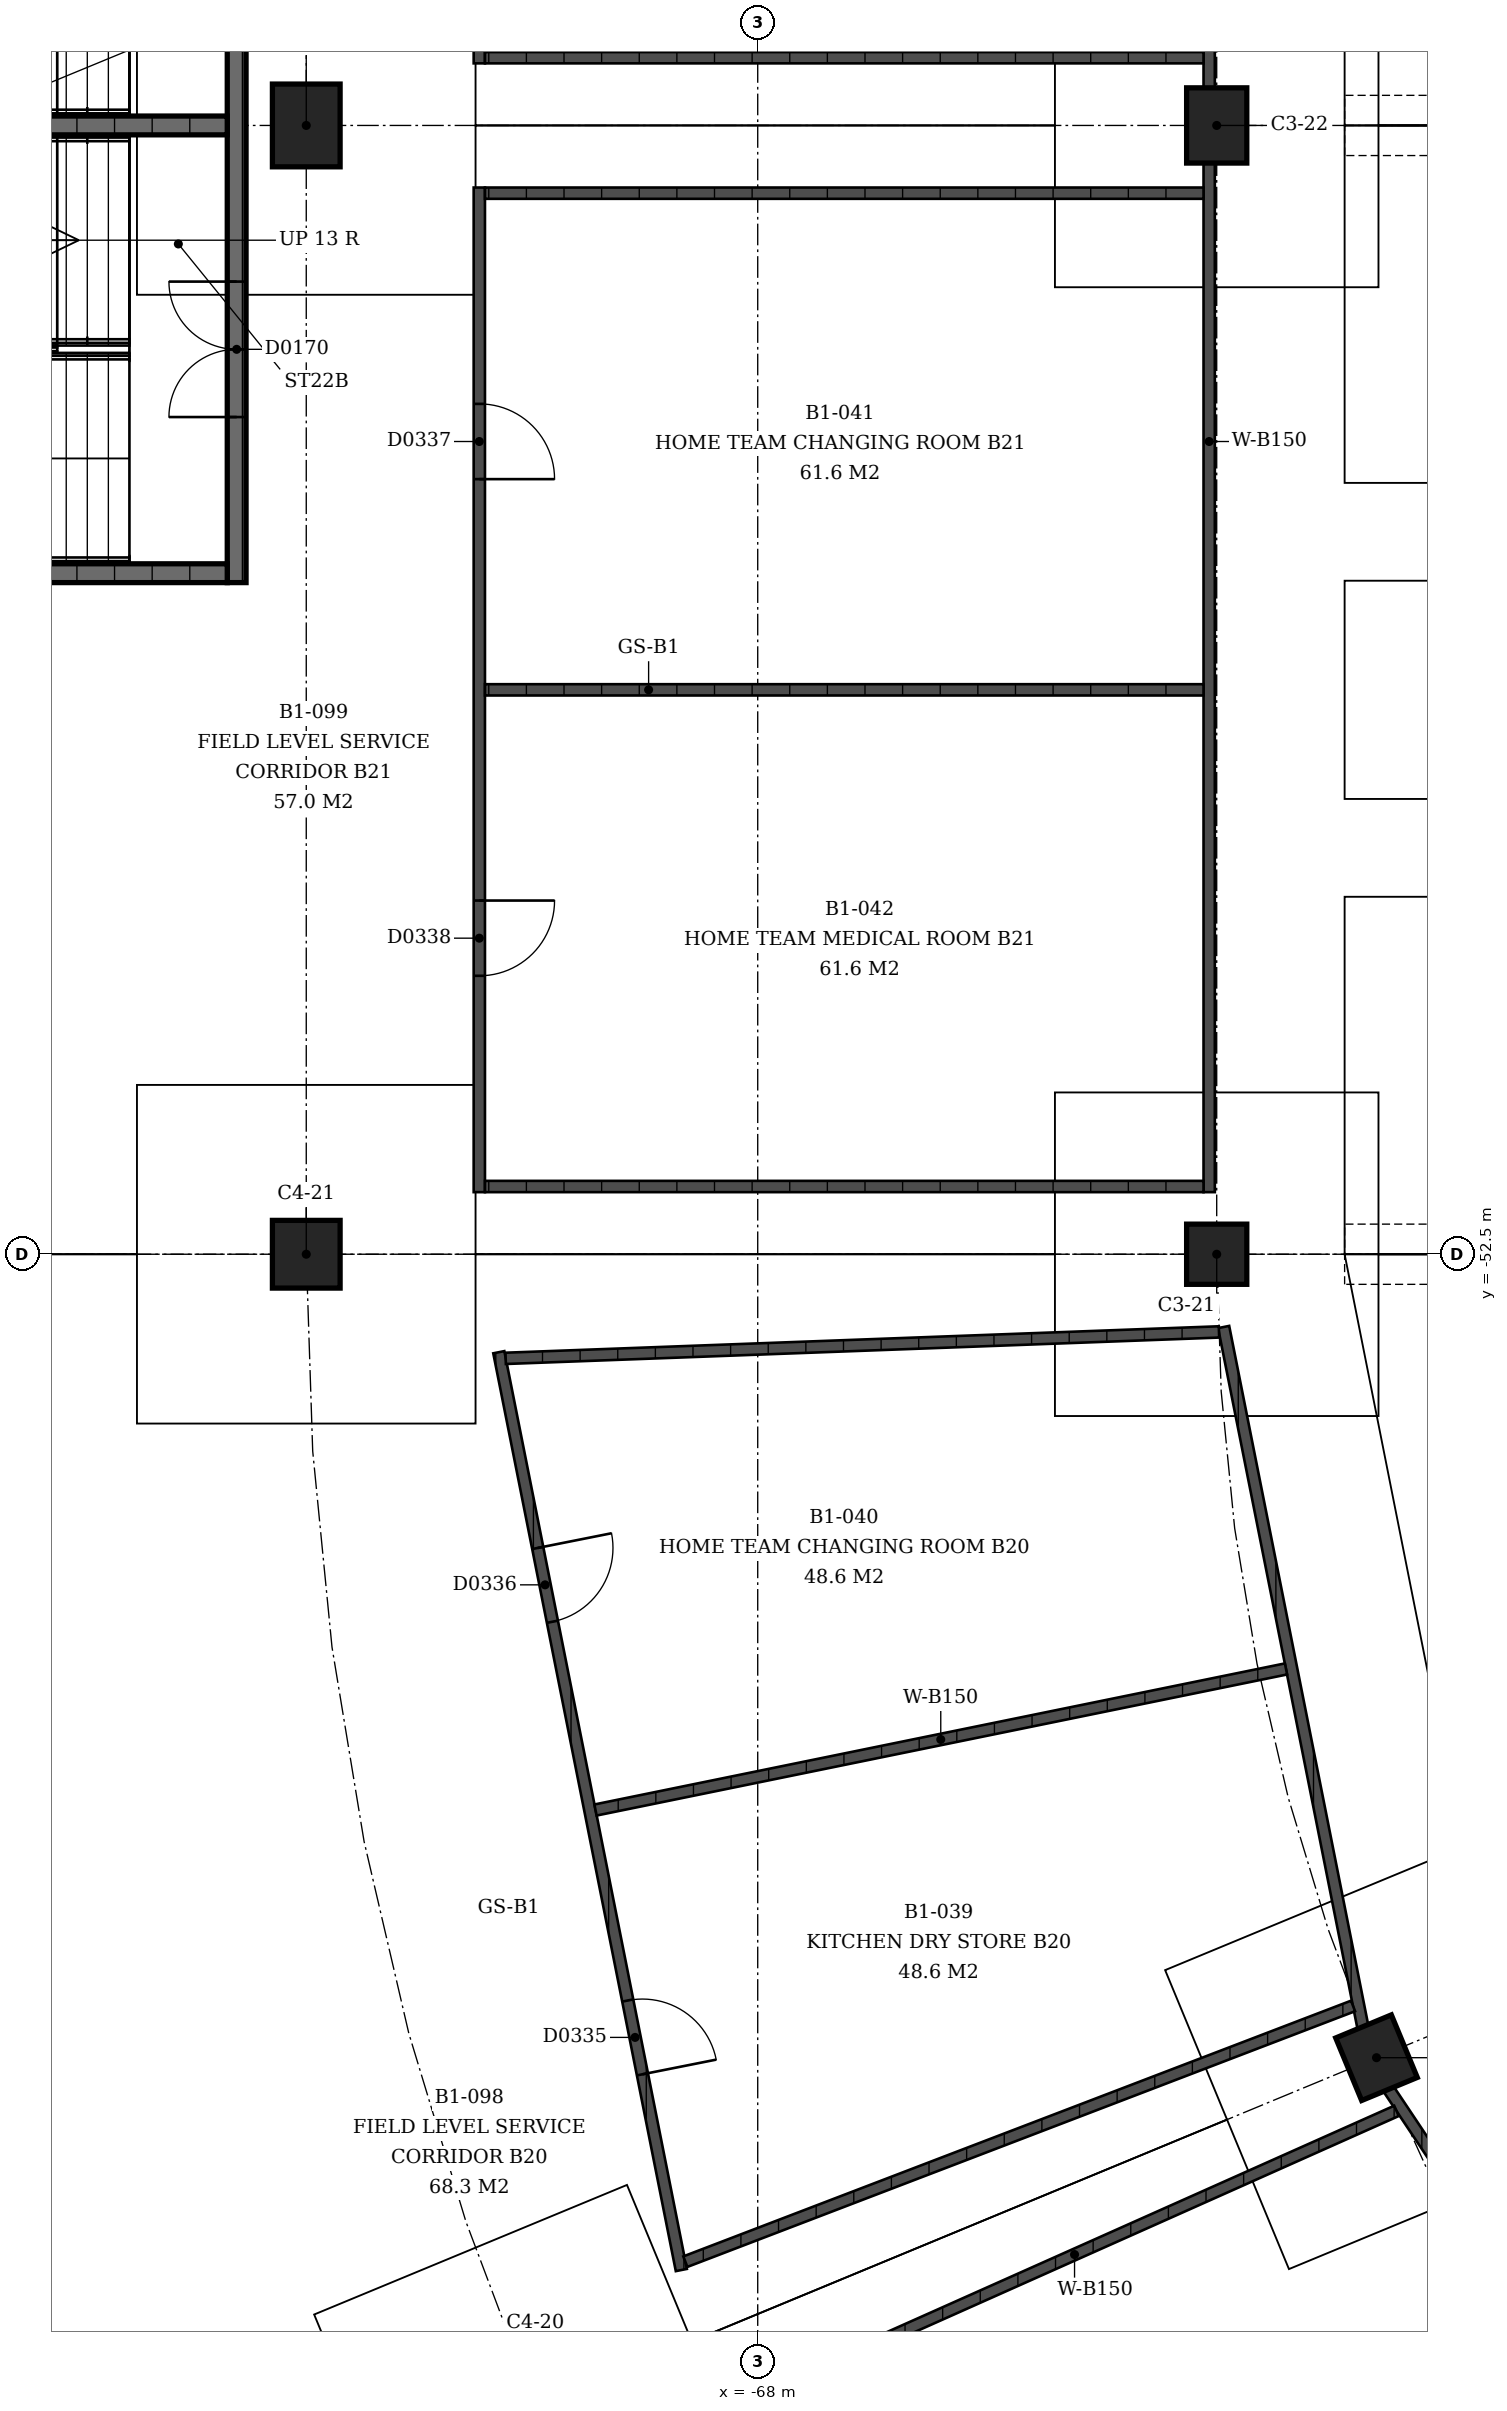
"""IFC4 building model, lengths in metres.
Left out: names, types, materials, properties, quantities, classifications, styles, units other than length and angle.
Written with IfcOpenShell. Run it as: python <this file> out.ifc"""

import sys

from ifc_helpers import new_model, si_unit, direction, frame, frame_2d, origin, origin_2d, place, context, subcontext, project, spatial, rectangle, extrude, element, fill, save


model = new_model("IFC4")
c1 = context("Model", 3, precision=1e-05, world=origin(), true_north=direction((0.0, 1.0)))
c2 = subcontext(c1, "Body", "Model", "MODEL_VIEW")
j1 = project(units=[si_unit("LENGTHUNIT", "METRE"), si_unit("PLANEANGLEUNIT", "RADIAN")], contexts=[c1])
p1 = place(None, origin())
s1 = spatial("IfcSite", under=j1, at=p1, CompositionType="ELEMENT")
p2 = place(p1, origin())
s2 = spatial("IfcBuilding", under=s1, at=p2, CompositionType="ELEMENT")
p3 = place(p2, frame((0.0, 0.0, -4.5)))
s3 = spatial("IfcBuildingStorey", under=s2, at=p3, CompositionType="ELEMENT", Elevation=-4.5)
p4 = place(p3, frame((-59.776, -63.177, 0.0), z_axis=(0.0, 0.0, 1.0), x_axis=(0.382683432365, -0.923879532511, 0.0)))
e1 = element("IfcColumn", 1, at=p4, inside=s3, PredefinedType="COLUMN", context=c2, shape_type="SweptSolid", body=[
    extrude(rectangle(XDim=0.9, YDim=0.8, at=origin_2d()), origin(), (0.0, 0.0, 1.0), 4.5),
])
p5 = place(p3, frame((-61.9, -52.5, 0.0), z_axis=(0.0, 0.0, 1.0), x_axis=(0.0, -1.0, 0.0)))
e2 = element("IfcColumn", 2, at=p5, inside=s3, PredefinedType="COLUMN", context=c2, shape_type="SweptSolid", body=[
    extrude(rectangle(XDim=0.8, YDim=0.8, at=origin_2d()), origin(), (0.0, 0.0, 1.0), 4.5),
])
p6 = place(p3, frame((-74.0, -52.5, 0.0), z_axis=(0.0, 0.0, 1.0), x_axis=(0.0, -1.0, 0.0)))
e3 = element("IfcColumn", 3, at=p6, inside=s3, PredefinedType="COLUMN", context=c2, shape_type="SweptSolid", body=[
    extrude(rectangle(XDim=0.9, YDim=0.9, at=origin_2d()), origin(), (0.0, 0.0, 1.0), 4.5),
])
p7 = place(p3, frame((-61.9, -37.5, 0.0), z_axis=(0.0, 0.0, 1.0), x_axis=(0.0, -1.0, 0.0)))
e4 = element("IfcColumn", 4, at=p7, inside=s3, PredefinedType="COLUMN", context=c2, shape_type="SweptSolid", body=[
    extrude(rectangle(XDim=1.0, YDim=0.8, at=origin_2d()), origin(), (0.0, 0.0, 1.0), 4.5),
])
p8 = place(p3, frame((-74.0, -37.5, 0.0), z_axis=(0.0, 0.0, 1.0), x_axis=(0.0, -1.0, 0.0)))
e5 = element("IfcColumn", 5, at=p8, inside=s3, PredefinedType="COLUMN", context=c2, shape_type="SweptSolid", body=[
    extrude(rectangle(XDim=1.1, YDim=0.9, at=origin_2d()), origin(), (0.0, 0.0, 1.0), 4.5),
])
p9 = place(p3, frame((-74.925, -31.425, 0.0), z_axis=(0.0, 0.0, 1.0), x_axis=(0.0, -1.0, 0.0)))
e6 = element("IfcWall", 6, at=p9, inside=s3, PredefinedType="SHEAR", context=c2, shape_type="SweptSolid", body=[
    extrude(rectangle(XDim=12.15, YDim=0.25, at=frame_2d((6.075, 0.0))), origin(), (0.0, 0.0, 1.0), 4.09),
])
p10 = place(p9, frame((2.2, 0.0, 0.0)))
e7 = element("IfcOpeningElement", 7, at=p10, cuts=e6, PredefinedType="OPENING", context=c2, shape_type="SweptSolid", body=[
    extrude(rectangle(XDim=1.8, YDim=2.1, at=frame_2d((0.9, 1.05))), frame((0.0, 0.125, 0.0), z_axis=(0.0, -1.0, 0.0), x_axis=(1.0, 0.0, 0.0)), (0.0, 0.0, 1.0), 0.25),
])
p11 = place(p9, frame((8.15, 0.0, 0.0)))
e8 = element("IfcOpeningElement", 8, at=p11, cuts=e6, PredefinedType="OPENING", context=c2, shape_type="SweptSolid", body=[
    extrude(rectangle(XDim=1.8, YDim=2.1, at=frame_2d((0.9, 1.05))), frame((0.0, 0.125, 0.0), z_axis=(0.0, -1.0, 0.0), x_axis=(1.0, 0.0, 0.0)), (0.0, 0.0, 1.0), 0.25),
])
for number, where, z_axis, x_axis in (
    (9, (-75.05, -43.45, 0.0), (0.0, 0.0, 1.0), (-1.0, 0.0, 0.0)),
    (10, (-75.05, -37.5, 0.0), (0.0, 0.0, 1.0), (-1.0, 0.0, 0.0)),
):
    element("IfcWall", number, at=place(p3, frame(where, z_axis=z_axis, x_axis=x_axis)), inside=s3, PredefinedType="SHEAR", context=c2, shape_type="SweptSolid", body=[
        extrude(rectangle(XDim=7.46, YDim=0.25, at=frame_2d((3.73, 0.0))), origin(), (0.0, 0.0, 1.0), 4.09),
    ])
p12 = place(p3, frame((-59.614, -63.597, 0.0), z_axis=(0.0, 0.0, 1.0), x_axis=(0.555579425305, -0.831463470141, 0.0)))
e11 = element("IfcWall", 11, at=p12, inside=s3, PredefinedType="SOLIDWALL", context=c2, shape_type="SweptSolid", body=[
    extrude(rectangle(XDim=9.48, YDim=0.15, at=frame_2d((4.74, 0.0))), origin(), (0.0, 0.0, 1.0), 3.0),
])
p13 = place(p3, frame((-59.51, -63.883, 0.0), z_axis=(0.0, 0.0, 1.0), x_axis=(-0.913203450279, -0.407503936666, 0.0)))
e12 = element("IfcWall", 12, at=p13, inside=s3, PredefinedType="SOLIDWALL", context=c2, shape_type="SweptSolid", body=[
    extrude(rectangle(XDim=9.502, YDim=0.15, at=frame_2d((4.751, 0.0))), origin(), (0.0, 0.0, 1.0), 3.0),
])
p14 = place(p3, frame((-59.958, -62.765, 0.0), z_axis=(0.0, 0.0, 1.0), x_axis=(-0.195076015612, 0.980788126016, 0.0)))
e13 = element("IfcWall", 13, at=p14, inside=s3, PredefinedType="SOLIDWALL", context=c2, shape_type="SweptSolid", body=[
    extrude(rectangle(XDim=9.48, YDim=0.15, at=frame_2d((4.74, 0.0))), origin(), (0.0, 0.0, 1.0), 3.0),
])
p15 = place(p3, frame((-69.015, -65.999, 0.0), z_axis=(0.0, 0.0, 1.0), x_axis=(-0.195089091876, 0.980785525093, 0.0)))
e14 = element("IfcWall", 14, at=p15, inside=s3, PredefinedType="SOLIDWALL", context=c2, shape_type="SweptSolid", body=[
    extrude(rectangle(XDim=12.436, YDim=0.15, at=frame_2d((6.218, 0.0))), origin(), (0.0, 0.0, 1.0), 3.0),
])
p16 = place(p15, frame((2.652, 0.0, 0.0)))
e15 = element("IfcOpeningElement", 15, at=p16, cuts=e14, PredefinedType="OPENING", context=c2, shape_type="SweptSolid", body=[
    extrude(rectangle(XDim=1.0, YDim=2.1, at=frame_2d((0.5, 1.05))), frame((0.0, 0.075, 0.0), z_axis=(0.0, -1.0, 0.0), x_axis=(1.0, 0.0, 0.0)), (0.0, 0.0, 1.0), 0.15),
])
p17 = place(p15, frame((8.784, 0.0, 0.0)))
e16 = element("IfcOpeningElement", 16, at=p17, cuts=e14, PredefinedType="OPENING", context=c2, shape_type="SweptSolid", body=[
    extrude(rectangle(XDim=1.0, YDim=2.1, at=frame_2d((0.5, 1.05))), frame((0.0, 0.075, 0.0), z_axis=(0.0, -1.0, 0.0), x_axis=(1.0, 0.0, 0.0)), (0.0, 0.0, 1.0), 0.15),
])
p18 = place(p3, frame((-60.088, -62.49, 0.0), z_axis=(0.0, 0.0, 1.0), x_axis=(-0.93388157938, -0.357582432029, 0.0)))
e17 = element("IfcWall", 17, at=p18, inside=s3, PredefinedType="SOLIDWALL", context=c2, shape_type="SweptSolid", body=[
    extrude(rectangle(XDim=9.502, YDim=0.15, at=frame_2d((4.751, 0.0))), origin(), (0.0, 0.0, 1.0), 3.0),
])
p19 = place(p3, frame((-60.979, -58.011, 0.0), z_axis=(0.0, 0.0, 1.0), x_axis=(-0.979770487126, -0.200124442675, 0.0)))
e18 = element("IfcWall", 18, at=p19, inside=s3, PredefinedType="SOLIDWALL", context=c2, shape_type="SweptSolid", body=[
    extrude(rectangle(XDim=9.367, YDim=0.15, at=frame_2d((4.683, 0.0))), origin(), (0.0, 0.0, 1.0), 3.0),
])
p20 = place(p3, frame((-61.87, -53.532, 0.0), z_axis=(0.0, 0.0, 1.0), x_axis=(-0.999315010022, -0.037006901301, 0.0)))
e19 = element("IfcWall", 19, at=p20, inside=s3, PredefinedType="SOLIDWALL", context=c2, shape_type="SweptSolid", body=[
    extrude(rectangle(XDim=9.487, YDim=0.15, at=frame_2d((4.743, 0.0))), origin(), (0.0, 0.0, 1.0), 3.0),
])
p21 = place(p3, frame((-62.0, -38.0, 0.0), z_axis=(0.0, 0.0, 1.0), x_axis=(0.0, -1.0, 0.0)))
e20 = element("IfcWall", 20, at=p21, inside=s3, PredefinedType="SOLIDWALL", context=c2, shape_type="SweptSolid", body=[
    extrude(rectangle(XDim=13.675, YDim=0.15, at=frame_2d((6.837, 0.0))), origin(), (0.0, 0.0, 1.0), 3.0),
])
p22 = place(p3, frame((-71.7, -38.325, 0.0), z_axis=(0.0, 0.0, 1.0), x_axis=(0.0, -1.0, 0.0)))
e21 = element("IfcWall", 21, at=p22, inside=s3, PredefinedType="SOLIDWALL", context=c2, shape_type="SweptSolid", body=[
    extrude(rectangle(XDim=13.35, YDim=0.15, at=frame_2d((6.675, 0.0))), origin(), (0.0, 0.0, 1.0), 3.0),
])
p23 = place(p22, frame((2.875, 0.0, 0.0)))
e22 = element("IfcOpeningElement", 22, at=p23, cuts=e21, PredefinedType="OPENING", context=c2, shape_type="SweptSolid", body=[
    extrude(rectangle(XDim=1.0, YDim=2.1, at=frame_2d((0.5, 1.05))), frame((0.0, 0.075, 0.0), z_axis=(0.0, -1.0, 0.0), x_axis=(1.0, 0.0, 0.0)), (0.0, 0.0, 1.0), 0.15),
])
p24 = place(p22, frame((9.475, 0.0, 0.0)))
e23 = element("IfcOpeningElement", 23, at=p24, cuts=e21, PredefinedType="OPENING", context=c2, shape_type="SweptSolid", body=[
    extrude(rectangle(XDim=1.0, YDim=2.1, at=frame_2d((0.5, 1.05))), frame((0.0, 0.075, 0.0), z_axis=(0.0, -1.0, 0.0), x_axis=(1.0, 0.0, 0.0)), (0.0, 0.0, 1.0), 0.15),
])
for number, where, z_axis, x_axis in (
    (24, (-62.075, -38.4, 0.0), (0.0, 0.0, 1.0), (-1.0, 0.0, 0.0)),
    (25, (-62.075, -45.0, 0.0), (0.0, 0.0, 1.0), (-1.0, 0.0, 0.0)),
    (26, (-62.075, -51.6, 0.0), (0.0, 0.0, 1.0), (-1.0, 0.0, 0.0)),
):
    element("IfcWall", number, at=place(p3, frame(where, z_axis=z_axis, x_axis=x_axis)), inside=s3, PredefinedType="SOLIDWALL", context=c2, shape_type="SweptSolid", body=[
        extrude(rectangle(XDim=9.55, YDim=0.15, at=frame_2d((4.775, 0.0))), origin(), (0.0, 0.0, 1.0), 3.0),
    ])
p25 = place(p3, frame((-62.0, -37.0, 0.0), z_axis=(0.0, 0.0, 1.0), x_axis=(0.0, 1.0, 0.0)))
e27 = element("IfcWall", 27, at=p25, inside=s3, PredefinedType="SOLIDWALL", context=c2, shape_type="SweptSolid", body=[
    extrude(rectangle(XDim=13.675, YDim=0.15, at=frame_2d((6.837, 0.0))), origin(), (0.0, 0.0, 1.0), 3.0),
])
p26 = place(p3, frame((-71.7, -36.675, 0.0), z_axis=(0.0, 0.0, 1.0), x_axis=(0.0, 1.0, 0.0)))
e28 = element("IfcWall", 28, at=p26, inside=s3, PredefinedType="SOLIDWALL", context=c2, shape_type="SweptSolid", body=[
    extrude(rectangle(XDim=13.35, YDim=0.15, at=frame_2d((6.675, 0.0))), origin(), (0.0, 0.0, 1.0), 3.0),
])
p27 = place(p26, frame((2.875, 0.0, 0.0)))
e29 = element("IfcOpeningElement", 29, at=p27, cuts=e28, PredefinedType="OPENING", context=c2, shape_type="SweptSolid", body=[
    extrude(rectangle(XDim=1.0, YDim=2.1, at=frame_2d((0.5, 1.05))), frame((0.0, 0.075, 0.0), z_axis=(0.0, -1.0, 0.0), x_axis=(1.0, 0.0, 0.0)), (0.0, 0.0, 1.0), 0.15),
])
p28 = place(p26, frame((9.475, 0.0, 0.0)))
e30 = element("IfcOpeningElement", 30, at=p28, cuts=e28, PredefinedType="OPENING", context=c2, shape_type="SweptSolid", body=[
    extrude(rectangle(XDim=1.0, YDim=2.1, at=frame_2d((0.5, 1.05))), frame((0.0, 0.075, 0.0), z_axis=(0.0, -1.0, 0.0), x_axis=(1.0, 0.0, 0.0)), (0.0, 0.0, 1.0), 0.15),
])
p29 = place(p3, frame((-62.075, -36.6, 0.0), z_axis=(0.0, 0.0, 1.0), x_axis=(-1.0, 0.0, 0.0)))
e31 = element("IfcWall", 31, at=p29, inside=s3, PredefinedType="SOLIDWALL", context=c2, shape_type="SweptSolid", body=[
    extrude(rectangle(XDim=9.55, YDim=0.15, at=frame_2d((4.775, 0.0))), origin(), (0.0, 0.0, 1.0), 3.0),
])
p30 = place(p11, origin())
e32 = element("IfcDoor", 32, at=p30, inside=s3, OperationType="DOUBLE_DOOR_SINGLE_SWING", PredefinedType="DOOR", context=c2, shape_type="SweptSolid", body=[
    extrude(rectangle(XDim=1.8, YDim=2.1, at=frame_2d((0.9, 1.05))), frame((0.0, 0.025, 0.0), z_axis=(0.0, -1.0, 0.0), x_axis=(1.0, 0.0, 0.0)), (0.0, 0.0, 1.0), 0.05),
])
fill(e8, e32)
p31 = place(p16, origin())
e33 = element("IfcDoor", 33, at=p31, inside=s3, OperationType="SINGLE_SWING_LEFT", PredefinedType="DOOR", context=c2, shape_type="SweptSolid", body=[
    extrude(rectangle(XDim=1.0, YDim=2.1, at=frame_2d((0.5, 1.05))), frame((0.0, 0.025, 0.0), z_axis=(0.0, -1.0, 0.0), x_axis=(1.0, 0.0, 0.0)), (0.0, 0.0, 1.0), 0.05),
])
fill(e15, e33)
p32 = place(p17, origin())
e34 = element("IfcDoor", 34, at=p32, inside=s3, OperationType="SINGLE_SWING_RIGHT", PredefinedType="DOOR", context=c2, shape_type="SweptSolid", body=[
    extrude(rectangle(XDim=1.0, YDim=2.1, at=frame_2d((0.5, 1.05))), frame((0.0, 0.025, 0.0), z_axis=(0.0, -1.0, 0.0), x_axis=(1.0, 0.0, 0.0)), (0.0, 0.0, 1.0), 0.05),
])
fill(e16, e34)
p33 = place(p23, origin())
e35 = element("IfcDoor", 35, at=p33, inside=s3, OperationType="SINGLE_SWING_LEFT", PredefinedType="DOOR", context=c2, shape_type="SweptSolid", body=[
    extrude(rectangle(XDim=1.0, YDim=2.1, at=frame_2d((0.5, 1.05))), frame((0.0, 0.025, 0.0), z_axis=(0.0, -1.0, 0.0), x_axis=(1.0, 0.0, 0.0)), (0.0, 0.0, 1.0), 0.05),
])
fill(e22, e35)
p34 = place(p24, origin())
e36 = element("IfcDoor", 36, at=p34, inside=s3, OperationType="SINGLE_SWING_RIGHT", PredefinedType="DOOR", context=c2, shape_type="SweptSolid", body=[
    extrude(rectangle(XDim=1.0, YDim=2.1, at=frame_2d((0.5, 1.05))), frame((0.0, 0.025, 0.0), z_axis=(0.0, -1.0, 0.0), x_axis=(1.0, 0.0, 0.0)), (0.0, 0.0, 1.0), 0.05),
])
fill(e23, e36)
save(model, sys.argv[1])
